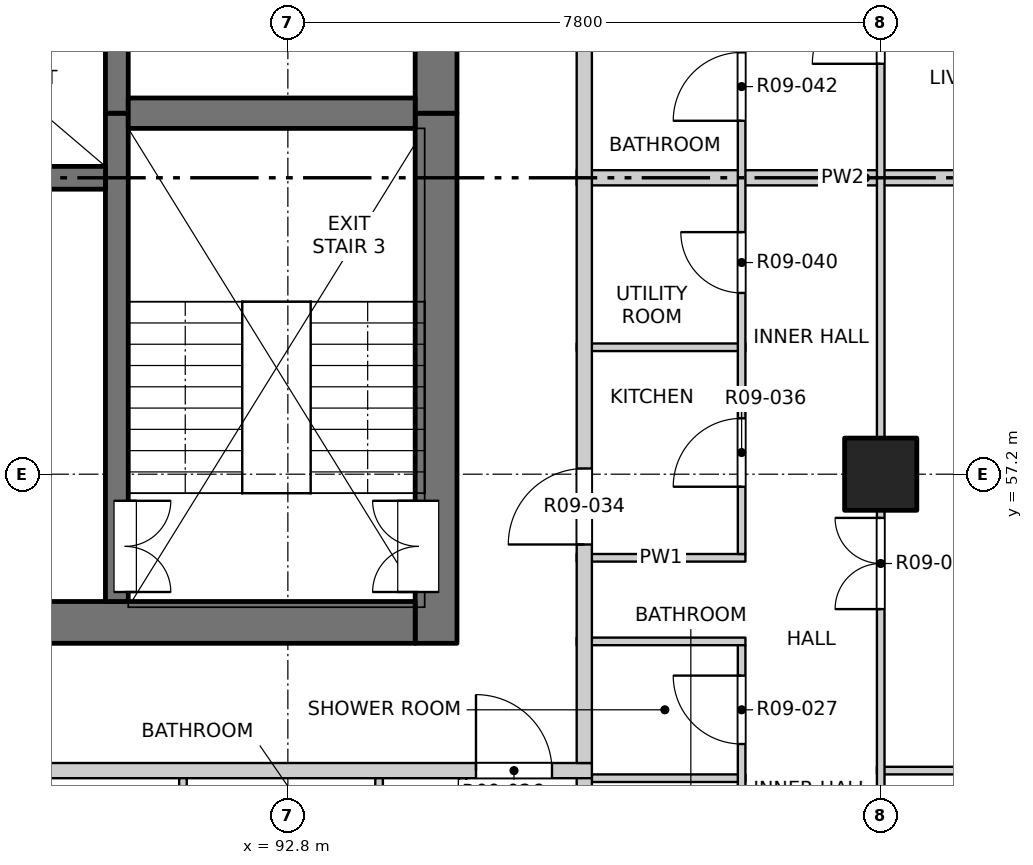
"""IFC4 building model, lengths in metres.
Left out: names, types, materials, properties, quantities, classifications, styles, units other than length and angle.
Written with IfcOpenShell. Run it as: python <this file> out.ifc"""

import sys

from ifc_helpers import new_model, si_unit, direction, frame, frame_2d, origin, origin_2d, place, context, subcontext, project, spatial, rectangle, extrude, element, fill, save


model = new_model("IFC4")
c1 = context("Model", 3, precision=1e-05, world=origin(), true_north=direction((0.0, 1.0)))
c2 = subcontext(c1, "Body", "Model", "MODEL_VIEW")
j1 = project(units=[si_unit("LENGTHUNIT", "METRE"), si_unit("PLANEANGLEUNIT", "RADIAN")], contexts=[c1])
p1 = place(None, origin())
s1 = spatial("IfcSite", under=j1, at=p1, CompositionType="ELEMENT")
p2 = place(p1, origin())
s2 = spatial("IfcBuilding", under=s1, at=p2, CompositionType="ELEMENT")
p3 = place(p2, frame((0.0, 0.0, 110.1)))
s3 = spatial("IfcBuildingStorey", under=s2, at=p3, CompositionType="ELEMENT", Elevation=110.1)
p4 = place(p3, frame((100.6, 57.2, -0.25), z_axis=(0.0, 0.0, 1.0), x_axis=(1.0, 0.0, 0.0)))
e1 = element("IfcColumn", 1, at=p4, inside=s3, PredefinedType="COLUMN", context=c2, shape_type="SweptSolid", body=[
    extrude(rectangle(XDim=0.95, YDim=0.95, at=origin_2d()), origin(), (0.0, 0.0, 1.0), 3.4),
])
p5 = place(p3, frame((94.75, 54.975, -0.25), z_axis=(0.0, 0.0, 1.0), x_axis=(0.0, 1.0, 0.0)))
e2 = element("IfcWall", 2, at=p5, inside=s3, PredefinedType="SOLIDWALL", context=c2, shape_type="SweptSolid", body=[
    extrude(rectangle(XDim=6.975, YDim=0.55, at=frame_2d((3.487, 0.0))), origin(), (0.0, 0.0, 1.0), 3.4),
])
p6 = place(p5, frame((0.675, 0.0, 0.25)))
e3 = element("IfcOpeningElement", 3, at=p6, cuts=e2, PredefinedType="OPENING", context=c2, shape_type="SweptSolid", body=[
    extrude(rectangle(XDim=1.2, YDim=2.1, at=frame_2d((0.6, 1.05))), frame((0.0, 0.285, 0.0), z_axis=(0.0, -1.0, 0.0), x_axis=(1.0, 0.0, 0.0)), (0.0, 0.0, 1.0), 0.57),
])
p7 = place(p3, frame((94.75, 61.95, -0.25), z_axis=(0.0, 0.0, 1.0), x_axis=(0.0, 1.0, 0.0)))
e4 = element("IfcWall", 4, at=p7, inside=s3, PredefinedType="SOLIDWALL", context=c2, shape_type="SweptSolid", body=[
    extrude(rectangle(XDim=15.35, YDim=0.55, at=frame_2d((7.675, 0.0))), origin(), (0.0, 0.0, 1.0), 3.4),
])
p8 = place(p7, frame((0.925, 0.0, 0.25)))
e5 = element("IfcOpeningElement", 5, at=p8, cuts=e4, PredefinedType="OPENING", context=c2, shape_type="SweptSolid", body=[
    extrude(rectangle(XDim=0.9, YDim=2.1, at=frame_2d((0.45, 1.05))), frame((0.0, 0.285, 0.0), z_axis=(0.0, -1.0, 0.0), x_axis=(1.0, 0.0, 0.0)), (0.0, 0.0, 1.0), 0.57),
])
p9 = place(p7, frame((3.8, 0.0, 0.25)))
e6 = element("IfcOpeningElement", 6, at=p9, cuts=e4, PredefinedType="OPENING", context=c2, shape_type="SweptSolid", body=[
    extrude(rectangle(XDim=0.9, YDim=2.1, at=frame_2d((0.45, 1.05))), frame((0.0, 0.285, 0.0), z_axis=(0.0, -1.0, 0.0), x_axis=(1.0, 0.0, 0.0)), (0.0, 0.0, 1.0), 0.57),
])
p10 = place(p7, frame((8.3, 0.0, 0.25)))
e7 = element("IfcOpeningElement", 7, at=p10, cuts=e4, PredefinedType="OPENING", context=c2, shape_type="SweptSolid", body=[
    extrude(rectangle(XDim=0.9, YDim=2.1, at=frame_2d((0.45, 1.05))), frame((0.0, 0.285, 0.0), z_axis=(0.0, -1.0, 0.0), x_axis=(1.0, 0.0, 0.0)), (0.0, 0.0, 1.0), 0.57),
])
p11 = place(p7, frame((13.1, 0.0, 0.25)))
e8 = element("IfcOpeningElement", 8, at=p11, cuts=e4, PredefinedType="OPENING", context=c2, shape_type="SweptSolid", body=[
    extrude(rectangle(XDim=0.9, YDim=2.1, at=frame_2d((0.45, 1.05))), frame((0.0, 0.285, 0.0), z_axis=(0.0, -1.0, 0.0), x_axis=(1.0, 0.0, 0.0)), (0.0, 0.0, 1.0), 0.57),
])
p12 = place(p3, frame((75.525, 55.25, -0.25), z_axis=(0.0, 0.0, 1.0), x_axis=(1.0, 0.0, 0.0)))
e9 = element("IfcWall", 9, at=p12, inside=s3, PredefinedType="SOLIDWALL", context=c2, shape_type="SweptSolid", body=[
    extrude(rectangle(XDim=18.95, YDim=0.55, at=frame_2d((9.475, 0.0))), origin(), (0.0, 0.0, 1.0), 3.4),
])
p13 = place(p12, frame((8.725, 0.0, 0.25)))
e10 = element("IfcOpeningElement", 10, at=p13, cuts=e9, PredefinedType="OPENING", context=c2, shape_type="SweptSolid", body=[
    extrude(rectangle(XDim=1.5, YDim=2.1, at=frame_2d((0.75, 1.05))), frame((0.0, 0.285, 0.0), z_axis=(0.0, -1.0, 0.0), x_axis=(1.0, 0.0, 0.0)), (0.0, 0.0, 1.0), 0.57),
])
p14 = place(p3, frame((90.55, 55.525, -0.25), z_axis=(0.0, 0.0, 1.0), x_axis=(0.0, 1.0, 0.0)))
e11 = element("IfcWall", 11, at=p14, inside=s3, PredefinedType="SOLIDWALL", context=c2, shape_type="SweptSolid", body=[
    extrude(rectangle(XDim=6.425, YDim=0.3, at=frame_2d((3.212, 0.0))), origin(), (0.0, 0.0, 1.0), 3.4),
])
p15 = place(p14, frame((0.125, 0.0, 0.25)))
e12 = element("IfcOpeningElement", 12, at=p15, cuts=e11, PredefinedType="OPENING", context=c2, shape_type="SweptSolid", body=[
    extrude(rectangle(XDim=1.2, YDim=2.1, at=frame_2d((0.6, 1.05))), frame((0.0, 0.16, 0.0), z_axis=(0.0, -1.0, 0.0), x_axis=(1.0, 0.0, 0.0)), (0.0, 0.0, 1.0), 0.32),
])
p16 = place(p3, frame((90.55, 61.95, -0.25), z_axis=(0.0, 0.0, 1.0), x_axis=(0.0, 1.0, 0.0)))
e13 = element("IfcWall", 13, at=p16, inside=s3, PredefinedType="SOLIDWALL", context=c2, shape_type="SweptSolid", body=[
    extrude(rectangle(XDim=15.35, YDim=0.3, at=frame_2d((7.675, 0.0))), origin(), (0.0, 0.0, 1.0), 3.4),
])
p17 = place(p3, frame((87.4, 61.1, -0.25), z_axis=(0.0, 0.0, 1.0), x_axis=(1.0, 0.0, 0.0)))
e14 = element("IfcWall", 14, at=p17, inside=s3, PredefinedType="SOLIDWALL", context=c2, shape_type="SweptSolid", body=[
    extrude(rectangle(XDim=3.0, YDim=0.3, at=frame_2d((1.5, 0.0))), origin(), (0.0, 0.0, 1.0), 3.4),
])
p18 = place(p3, frame((90.7, 61.95, -0.25), z_axis=(0.0, 0.0, 1.0), x_axis=(1.0, 0.0, 0.0)))
e15 = element("IfcWall", 15, at=p18, inside=s3, PredefinedType="SOLIDWALL", context=c2, shape_type="SweptSolid", body=[
    extrude(rectangle(XDim=3.775, YDim=0.4, at=frame_2d((1.888, 0.0))), origin(), (0.0, 0.0, 1.0), 3.4),
])
p19 = place(p3, frame((96.8, 53.2, 0.0), z_axis=(0.0, 0.0, 1.0), x_axis=(1.0, 0.0, 0.0)))
e16 = element("IfcWall", 16, at=p19, inside=s3, PredefinedType="PARTITIONING", context=c2, shape_type="SweptSolid", body=[
    extrude(rectangle(XDim=2.02, YDim=0.1, at=frame_2d((1.01, 0.0))), origin(), (0.0, 0.0, 1.0), 3.15),
])
p20 = place(p3, frame((73.2, 53.3, 0.0), z_axis=(0.0, 0.0, 1.0), x_axis=(1.0, 0.0, 0.0)))
e17 = element("IfcWall", 17, at=p20, inside=s3, PredefinedType="PARTITIONING", context=c2, shape_type="SweptSolid", body=[
    extrude(rectangle(XDim=23.6, YDim=0.2, at=frame_2d((11.8, 0.0))), origin(), (0.0, 0.0, 1.0), 3.15),
])
p21 = place(p20, frame((10.375, 0.0, 0.0)))
e18 = element("IfcOpeningElement", 18, at=p21, cuts=e17, PredefinedType="OPENING", context=c2, shape_type="SweptSolid", body=[
    extrude(rectangle(XDim=1.0, YDim=2.1, at=frame_2d((0.5, 1.05))), frame((0.0, 0.11, 0.0), z_axis=(0.0, -1.0, 0.0), x_axis=(1.0, 0.0, 0.0)), (0.0, 0.0, 1.0), 0.22),
])
p22 = place(p20, frame((22.075, 0.0, 0.0)))
e19 = element("IfcOpeningElement", 19, at=p22, cuts=e17, PredefinedType="OPENING", context=c2, shape_type="SweptSolid", body=[
    extrude(rectangle(XDim=1.0, YDim=2.1, at=frame_2d((0.5, 1.05))), frame((0.0, 0.11, 0.0), z_axis=(0.0, -1.0, 0.0), x_axis=(1.0, 0.0, 0.0)), (0.0, 0.0, 1.0), 0.22),
])
p23 = place(p3, frame((100.55, 53.3, 0.0), z_axis=(0.0, 0.0, 1.0), x_axis=(1.0, 0.0, 0.0)))
e20 = element("IfcWall", 20, at=p23, inside=s3, PredefinedType="PARTITIONING", context=c2, shape_type="SweptSolid", body=[
    extrude(rectangle(XDim=3.65, YDim=0.1, at=frame_2d((1.825, 0.0))), origin(), (0.0, 0.0, 1.0), 3.15),
])
for number, where, z_axis, x_axis in (
    (21, (96.6, 55.0, 0.0), (0.0, 0.0, 1.0), (1.0, 0.0, 0.0)),
    (22, (96.6, 56.1, 0.0), (0.0, 0.0, 1.0), (1.0, 0.0, 0.0)),
    (23, (96.6, 58.87, 0.0), (0.0, 0.0, 1.0), (1.0, 0.0, 0.0)),
):
    element("IfcWall", number, at=place(p3, frame(where, z_axis=z_axis, x_axis=x_axis)), inside=s3, PredefinedType="PARTITIONING", context=c2, shape_type="SweptSolid", body=[
        extrude(rectangle(XDim=2.22, YDim=0.1, at=frame_2d((1.11, 0.0))), origin(), (0.0, 0.0, 1.0), 3.15),
    ])
p24 = place(p3, frame((96.6, 61.1, 0.0), z_axis=(0.0, 0.0, 1.0), x_axis=(1.0, 0.0, 0.0)))
e24 = element("IfcWall", 24, at=p24, inside=s3, PredefinedType="PARTITIONING", context=c2, shape_type="SweptSolid", body=[
    extrude(rectangle(XDim=7.6, YDim=0.2, at=frame_2d((3.8, 0.0))), origin(), (0.0, 0.0, 1.0), 2.55),
])
for number, where, z_axis, x_axis in (
    (25, (91.42, 51.28, 0.0), (0.0, 0.0, 1.0), (0.0, 1.0, 0.0)),
    (26, (94.0, 51.28, 0.0), (0.0, 0.0, 1.0), (0.0, 1.0, 0.0)),
    (27, (95.1, 51.28, 0.0), (0.0, 0.0, 1.0), (0.0, 1.0, 0.0)),
):
    element("IfcWall", number, at=place(p3, frame(where, z_axis=z_axis, x_axis=x_axis)), inside=s3, PredefinedType="PARTITIONING", context=c2, shape_type="SweptSolid", body=[
        extrude(rectangle(XDim=1.92, YDim=0.1, at=frame_2d((0.96, 0.0))), origin(), (0.0, 0.0, 1.0), 3.15),
    ])
p25 = place(p3, frame((96.7, 45.8, 0.0), z_axis=(0.0, 0.0, 1.0), x_axis=(0.0, 1.0, 0.0)))
e28 = element("IfcWall", 28, at=p25, inside=s3, PredefinedType="PARTITIONING", context=c2, shape_type="SweptSolid", body=[
    extrude(rectangle(XDim=7.4, YDim=0.2, at=frame_2d((3.7, 0.0))), origin(), (0.0, 0.0, 1.0), 3.15),
])
p26 = place(p3, frame((96.7, 53.4, 0.0), z_axis=(0.0, 0.0, 1.0), x_axis=(0.0, 1.0, 0.0)))
e29 = element("IfcWall", 29, at=p26, inside=s3, PredefinedType="PARTITIONING", context=c2, shape_type="SweptSolid", body=[
    extrude(rectangle(XDim=30.8, YDim=0.2, at=frame_2d((15.4, 0.0))), origin(), (0.0, 0.0, 1.0), 3.15),
])
p27 = place(p26, frame((2.875, 0.0, 0.0)))
e30 = element("IfcOpeningElement", 30, at=p27, cuts=e29, PredefinedType="OPENING", context=c2, shape_type="SweptSolid", body=[
    extrude(rectangle(XDim=1.0, YDim=2.1, at=frame_2d((0.5, 1.05))), frame((0.0, 0.11, 0.0), z_axis=(0.0, -1.0, 0.0), x_axis=(1.0, 0.0, 0.0)), (0.0, 0.0, 1.0), 0.22),
])
p28 = place(p26, frame((14.775, 0.0, 0.0)))
e31 = element("IfcOpeningElement", 31, at=p28, cuts=e29, PredefinedType="OPENING", context=c2, shape_type="SweptSolid", body=[
    extrude(rectangle(XDim=1.0, YDim=2.1, at=frame_2d((0.5, 1.05))), frame((0.0, 0.11, 0.0), z_axis=(0.0, -1.0, 0.0), x_axis=(1.0, 0.0, 0.0)), (0.0, 0.0, 1.0), 0.22),
])
p29 = place(p26, frame((20.025, 0.0, 0.0)))
e32 = element("IfcOpeningElement", 32, at=p29, cuts=e29, PredefinedType="OPENING", context=c2, shape_type="SweptSolid", body=[
    extrude(rectangle(XDim=1.0, YDim=2.1, at=frame_2d((0.5, 1.05))), frame((0.0, 0.11, 0.0), z_axis=(0.0, -1.0, 0.0), x_axis=(1.0, 0.0, 0.0)), (0.0, 0.0, 1.0), 0.22),
])
p30 = place(p3, frame((98.77, 49.45, 0.0), z_axis=(0.0, 0.0, 1.0), x_axis=(0.0, 1.0, 0.0)))
e33 = element("IfcWall", 33, at=p30, inside=s3, PredefinedType="PARTITIONING", context=c2, shape_type="SweptSolid", body=[
    extrude(rectangle(XDim=5.5, YDim=0.1, at=frame_2d((2.75, 0.0))), origin(), (0.0, 0.0, 1.0), 3.15),
])
p31 = place(p30, frame((0.475, 0.0, 0.0)))
e34 = element("IfcOpeningElement", 34, at=p31, cuts=e33, PredefinedType="OPENING", context=c2, shape_type="SweptSolid", body=[
    extrude(rectangle(XDim=0.8, YDim=2.1, at=frame_2d((0.4, 1.05))), frame((0.0, 0.06, 0.0), z_axis=(0.0, -1.0, 0.0), x_axis=(1.0, 0.0, 0.0)), (0.0, 0.0, 1.0), 0.12),
])
p32 = place(p30, frame((2.325, 0.0, 0.0)))
e35 = element("IfcOpeningElement", 35, at=p32, cuts=e33, PredefinedType="OPENING", context=c2, shape_type="SweptSolid", body=[
    extrude(rectangle(XDim=0.9, YDim=2.1, at=frame_2d((0.45, 1.05))), frame((0.0, 0.06, 0.0), z_axis=(0.0, -1.0, 0.0), x_axis=(1.0, 0.0, 0.0)), (0.0, 0.0, 1.0), 0.12),
])
p33 = place(p30, frame((4.2, 0.0, 0.0)))
e36 = element("IfcOpeningElement", 36, at=p33, cuts=e33, PredefinedType="OPENING", context=c2, shape_type="SweptSolid", body=[
    extrude(rectangle(XDim=0.9, YDim=2.1, at=frame_2d((0.45, 1.05))), frame((0.0, 0.06, 0.0), z_axis=(0.0, -1.0, 0.0), x_axis=(1.0, 0.0, 0.0)), (0.0, 0.0, 1.0), 0.12),
])
p34 = place(p3, frame((98.77, 56.15, 0.0), z_axis=(0.0, 0.0, 1.0), x_axis=(0.0, 1.0, 0.0)))
e37 = element("IfcWall", 37, at=p34, inside=s3, PredefinedType="PARTITIONING", context=c2, shape_type="SweptSolid", body=[
    extrude(rectangle(XDim=10.7, YDim=0.1, at=frame_2d((5.35, 0.0))), origin(), (0.0, 0.0, 1.0), 3.15),
])
p35 = place(p34, frame((0.885, 0.0, 0.0)))
e38 = element("IfcOpeningElement", 38, at=p35, cuts=e37, PredefinedType="OPENING", context=c2, shape_type="SweptSolid", body=[
    extrude(rectangle(XDim=0.9, YDim=2.1, at=frame_2d((0.45, 1.05))), frame((0.0, 0.06, 0.0), z_axis=(0.0, -1.0, 0.0), x_axis=(1.0, 0.0, 0.0)), (0.0, 0.0, 1.0), 0.12),
])
p36 = place(p34, frame((3.435, 0.0, 0.0)))
e39 = element("IfcOpeningElement", 39, at=p36, cuts=e37, PredefinedType="OPENING", context=c2, shape_type="SweptSolid", body=[
    extrude(rectangle(XDim=0.8, YDim=2.1, at=frame_2d((0.4, 1.05))), frame((0.0, 0.06, 0.0), z_axis=(0.0, -1.0, 0.0), x_axis=(1.0, 0.0, 0.0)), (0.0, 0.0, 1.0), 0.12),
])
p37 = place(p34, frame((5.7, 0.0, 0.0)))
e40 = element("IfcOpeningElement", 40, at=p37, cuts=e37, PredefinedType="OPENING", context=c2, shape_type="SweptSolid", body=[
    extrude(rectangle(XDim=0.9, YDim=2.1, at=frame_2d((0.45, 1.05))), frame((0.0, 0.06, 0.0), z_axis=(0.0, -1.0, 0.0), x_axis=(1.0, 0.0, 0.0)), (0.0, 0.0, 1.0), 0.12),
])
p38 = place(p34, frame((8.6, 0.0, 0.0)))
e41 = element("IfcOpeningElement", 41, at=p38, cuts=e37, PredefinedType="OPENING", context=c2, shape_type="SweptSolid", body=[
    extrude(rectangle(XDim=0.9, YDim=2.1, at=frame_2d((0.45, 1.05))), frame((0.0, 0.06, 0.0), z_axis=(0.0, -1.0, 0.0), x_axis=(1.0, 0.0, 0.0)), (0.0, 0.0, 1.0), 0.12),
])
p39 = place(p3, frame((100.6, 45.8, 0.0), z_axis=(0.0, 0.0, 1.0), x_axis=(0.0, 1.0, 0.0)))
e42 = element("IfcWall", 42, at=p39, inside=s3, PredefinedType="PARTITIONING", context=c2, shape_type="SweptSolid", body=[
    extrude(rectangle(XDim=38.4, YDim=0.1, at=frame_2d((19.2, 0.0))), origin(), (0.0, 0.0, 1.0), 3.15),
])
p40 = place(p39, frame((1.05, 0.0, 0.0)))
e43 = element("IfcOpeningElement", 43, at=p40, cuts=e42, PredefinedType="OPENING", context=c2, shape_type="SweptSolid", body=[
    extrude(rectangle(XDim=1.2, YDim=2.1, at=frame_2d((0.6, 1.05))), frame((0.0, 0.06, 0.0), z_axis=(0.0, -1.0, 0.0), x_axis=(1.0, 0.0, 0.0)), (0.0, 0.0, 1.0), 0.12),
])
p41 = place(p39, frame((5.1, 0.0, 0.0)))
e44 = element("IfcOpeningElement", 44, at=p41, cuts=e42, PredefinedType="OPENING", context=c2, shape_type="SweptSolid", body=[
    extrude(rectangle(XDim=0.9, YDim=2.1, at=frame_2d((0.45, 1.05))), frame((0.0, 0.06, 0.0), z_axis=(0.0, -1.0, 0.0), x_axis=(1.0, 0.0, 0.0)), (0.0, 0.0, 1.0), 0.12),
])
p42 = place(p39, frame((9.625, 0.0, 0.0)))
e45 = element("IfcOpeningElement", 45, at=p42, cuts=e42, PredefinedType="OPENING", context=c2, shape_type="SweptSolid", body=[
    extrude(rectangle(XDim=1.2, YDim=2.1, at=frame_2d((0.6, 1.05))), frame((0.0, 0.06, 0.0), z_axis=(0.0, -1.0, 0.0), x_axis=(1.0, 0.0, 0.0)), (0.0, 0.0, 1.0), 0.12),
])
p43 = place(p39, frame((16.8, 0.0, 0.0)))
e46 = element("IfcOpeningElement", 46, at=p43, cuts=e42, PredefinedType="OPENING", context=c2, shape_type="SweptSolid", body=[
    extrude(rectangle(XDim=0.9, YDim=2.1, at=frame_2d((0.45, 1.05))), frame((0.0, 0.06, 0.0), z_axis=(0.0, -1.0, 0.0), x_axis=(1.0, 0.0, 0.0)), (0.0, 0.0, 1.0), 0.12),
])
p44 = place(p39, frame((20.7, 0.0, 0.0)))
e47 = element("IfcOpeningElement", 47, at=p44, cuts=e42, PredefinedType="OPENING", context=c2, shape_type="SweptSolid", body=[
    extrude(rectangle(XDim=0.9, YDim=2.1, at=frame_2d((0.45, 1.05))), frame((0.0, 0.06, 0.0), z_axis=(0.0, -1.0, 0.0), x_axis=(1.0, 0.0, 0.0)), (0.0, 0.0, 1.0), 0.12),
])
p45 = place(p39, frame((24.6, 0.0, 0.0)))
e48 = element("IfcOpeningElement", 48, at=p45, cuts=e42, PredefinedType="OPENING", context=c2, shape_type="SweptSolid", body=[
    extrude(rectangle(XDim=0.9, YDim=2.1, at=frame_2d((0.45, 1.05))), frame((0.0, 0.06, 0.0), z_axis=(0.0, -1.0, 0.0), x_axis=(1.0, 0.0, 0.0)), (0.0, 0.0, 1.0), 0.12),
])
p46 = place(p39, frame((28.5, 0.0, 0.0)))
e49 = element("IfcOpeningElement", 49, at=p46, cuts=e42, PredefinedType="OPENING", context=c2, shape_type="SweptSolid", body=[
    extrude(rectangle(XDim=0.9, YDim=2.1, at=frame_2d((0.45, 1.05))), frame((0.0, 0.06, 0.0), z_axis=(0.0, -1.0, 0.0), x_axis=(1.0, 0.0, 0.0)), (0.0, 0.0, 1.0), 0.12),
])
p47 = place(p39, frame((32.4, 0.0, 0.0)))
e50 = element("IfcOpeningElement", 50, at=p47, cuts=e42, PredefinedType="OPENING", context=c2, shape_type="SweptSolid", body=[
    extrude(rectangle(XDim=0.9, YDim=2.1, at=frame_2d((0.45, 1.05))), frame((0.0, 0.06, 0.0), z_axis=(0.0, -1.0, 0.0), x_axis=(1.0, 0.0, 0.0)), (0.0, 0.0, 1.0), 0.12),
])
p48 = place(p39, frame((36.15, 0.0, 0.0)))
e51 = element("IfcOpeningElement", 51, at=p48, cuts=e42, PredefinedType="OPENING", context=c2, shape_type="SweptSolid", body=[
    extrude(rectangle(XDim=1.2, YDim=2.1, at=frame_2d((0.6, 1.05))), frame((0.0, 0.06, 0.0), z_axis=(0.0, -1.0, 0.0), x_axis=(1.0, 0.0, 0.0)), (0.0, 0.0, 1.0), 0.12),
])
p49 = place(p22, origin())
e52 = element("IfcDoor", 52, at=p49, inside=s3, OperationType="SINGLE_SWING_LEFT", PredefinedType="DOOR", context=c2, shape_type="SweptSolid", body=[
    extrude(rectangle(XDim=1.0, YDim=2.1, at=frame_2d((0.5, 1.05))), frame((0.0, 0.025, 0.0), z_axis=(0.0, -1.0, 0.0), x_axis=(1.0, 0.0, 0.0)), (0.0, 0.0, 1.0), 0.05),
])
fill(e19, e52)
p50 = place(p33, origin())
e53 = element("IfcDoor", 53, at=p50, inside=s3, OperationType="SINGLE_SWING_RIGHT", PredefinedType="DOOR", context=c2, shape_type="SweptSolid", body=[
    extrude(rectangle(XDim=0.9, YDim=2.1, at=frame_2d((0.45, 1.05))), frame((0.0, 0.025, 0.0), z_axis=(0.0, -1.0, 0.0), x_axis=(1.0, 0.0, 0.0)), (0.0, 0.0, 1.0), 0.05),
])
fill(e36, e53)
p51 = place(p42, origin())
e54 = element("IfcDoor", 54, at=p51, inside=s3, OperationType="DOUBLE_DOOR_SINGLE_SWING", PredefinedType="DOOR", context=c2, shape_type="SweptSolid", body=[
    extrude(rectangle(XDim=1.2, YDim=2.1, at=frame_2d((0.6, 1.05))), frame((0.0, 0.025, 0.0), z_axis=(0.0, -1.0, 0.0), x_axis=(1.0, 0.0, 0.0)), (0.0, 0.0, 1.0), 0.05),
])
fill(e45, e54)
p52 = place(p15, origin())
e55 = element("IfcDoor", 55, at=p52, inside=s3, OperationType="DOUBLE_DOOR_SINGLE_SWING", PredefinedType="DOOR", context=c2, shape_type="SweptSolid", body=[
    extrude(rectangle(XDim=1.2, YDim=2.1, at=frame_2d((0.6, 1.05))), frame((0.0, -0.085, 0.0), z_axis=(0.0, -1.0, 0.0), x_axis=(1.0, 0.0, 0.0)), (0.0, 0.0, 1.0), 0.05),
])
fill(e12, e55)
p53 = place(p6, origin())
e56 = element("IfcDoor", 56, at=p53, inside=s3, OperationType="DOUBLE_DOOR_SINGLE_SWING", PredefinedType="DOOR", context=c2, shape_type="SweptSolid", body=[
    extrude(rectangle(XDim=1.2, YDim=2.1, at=frame_2d((0.6, 1.05))), frame((0.0, 0.26, 0.0), z_axis=(0.0, -1.0, 0.0), x_axis=(1.0, 0.0, 0.0)), (0.0, 0.0, 1.0), 0.05),
])
fill(e3, e56)
p54 = place(p27, origin())
e57 = element("IfcDoor", 57, at=p54, inside=s3, OperationType="SINGLE_SWING_LEFT", PredefinedType="DOOR", context=c2, shape_type="SweptSolid", body=[
    extrude(rectangle(XDim=1.0, YDim=2.1, at=frame_2d((0.5, 1.05))), frame((0.0, 0.025, 0.0), z_axis=(0.0, -1.0, 0.0), x_axis=(1.0, 0.0, 0.0)), (0.0, 0.0, 1.0), 0.05),
])
fill(e30, e57)
p55 = place(p35, origin())
e58 = element("IfcDoor", 58, at=p55, inside=s3, OperationType="SINGLE_SWING_LEFT", PredefinedType="DOOR", context=c2, shape_type="SweptSolid", body=[
    extrude(rectangle(XDim=0.9, YDim=2.1, at=frame_2d((0.45, 1.05))), frame((0.0, 0.025, 0.0), z_axis=(0.0, -1.0, 0.0), x_axis=(1.0, 0.0, 0.0)), (0.0, 0.0, 1.0), 0.05),
])
fill(e38, e58)
p56 = place(p36, origin())
e59 = element("IfcDoor", 59, at=p56, inside=s3, OperationType="SINGLE_SWING_RIGHT", PredefinedType="DOOR", context=c2, shape_type="SweptSolid", body=[
    extrude(rectangle(XDim=0.8, YDim=2.1, at=frame_2d((0.4, 1.05))), frame((0.0, 0.025, 0.0), z_axis=(0.0, -1.0, 0.0), x_axis=(1.0, 0.0, 0.0)), (0.0, 0.0, 1.0), 0.05),
])
fill(e39, e59)
p57 = place(p37, origin())
e60 = element("IfcDoor", 60, at=p57, inside=s3, OperationType="SINGLE_SWING_LEFT", PredefinedType="DOOR", context=c2, shape_type="SweptSolid", body=[
    extrude(rectangle(XDim=0.9, YDim=2.1, at=frame_2d((0.45, 1.05))), frame((0.0, 0.025, 0.0), z_axis=(0.0, -1.0, 0.0), x_axis=(1.0, 0.0, 0.0)), (0.0, 0.0, 1.0), 0.05),
])
fill(e40, e60)
p58 = place(p43, origin())
e61 = element("IfcDoor", 61, at=p58, inside=s3, OperationType="SINGLE_SWING_LEFT", PredefinedType="DOOR", context=c2, shape_type="SweptSolid", body=[
    extrude(rectangle(XDim=0.9, YDim=2.1, at=frame_2d((0.45, 1.05))), frame((0.0, 0.025, 0.0), z_axis=(0.0, -1.0, 0.0), x_axis=(1.0, 0.0, 0.0)), (0.0, 0.0, 1.0), 0.05),
])
fill(e46, e61)
save(model, sys.argv[1])
